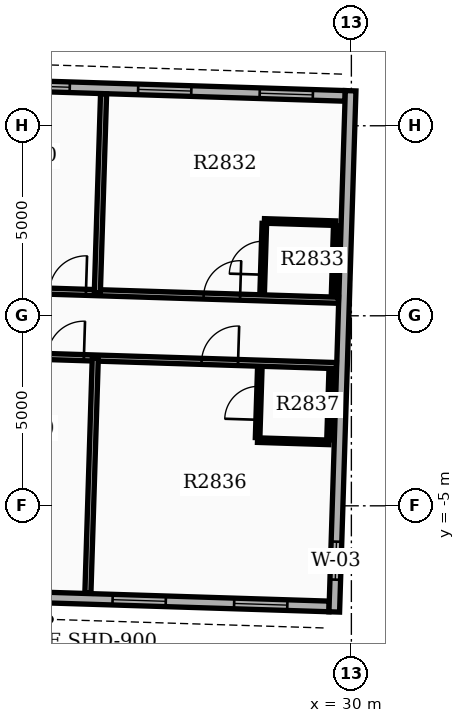
"""IFC4 building model, lengths in metres.
Left out: names, types, materials, properties, quantities, classifications, styles, units other than length and angle.
Written with IfcOpenShell. Run it as: python <this file> out.ifc"""

import sys

from ifc_helpers import new_model, si_unit, direction, frame, frame_2d, origin, place, context, subcontext, project, spatial, rectangle, extrude, element, fill, save


model = new_model("IFC4")
c1 = context("Model", 3, precision=1e-05, world=origin(), true_north=direction((0.0, 1.0)))
c2 = subcontext(c1, "Body", "Model", "MODEL_VIEW")
j1 = project(units=[si_unit("LENGTHUNIT", "METRE"), si_unit("PLANEANGLEUNIT", "RADIAN")], contexts=[c1])
p1 = place(None, origin())
s1 = spatial("IfcSite", under=j1, at=p1, CompositionType="ELEMENT")
p2 = place(p1, origin())
s2 = spatial("IfcBuilding", under=s1, at=p2, CompositionType="ELEMENT")
p3 = place(p2, frame((0.0, 0.0, 176.1)))
s3 = spatial("IfcBuildingStorey", under=s2, at=p3, CompositionType="ELEMENT", Elevation=176.1)
p4 = place(p3, frame((14.721, -7.186, 0.0), z_axis=(0.0, 0.0, 1.0), x_axis=(0.999506714454, -0.031405855522, 0.0)))
e1 = element("IfcWall", 1, at=p4, inside=s3, PredefinedType="STANDARD", context=c2, shape_type="SweptSolid", body=[
    extrude(rectangle(XDim=14.7, YDim=0.28, at=frame_2d((7.35, 0.0))), origin(), (0.0, 0.0, 1.0), 2.97),
])
p5 = place(p4, frame((4.05, 0.0, 0.8)))
e2 = element("IfcOpeningElement", 2, at=p5, cuts=e1, PredefinedType="OPENING", context=c2, shape_type="SweptSolid", body=[
    extrude(rectangle(XDim=1.4, YDim=1.6, at=frame_2d((0.7, 0.8))), frame((0.0, 0.15, 0.0), z_axis=(0.0, -1.0, 0.0), x_axis=(1.0, 0.0, 0.0)), (0.0, 0.0, 1.0), 0.3),
])
p6 = place(p4, frame((9.0, 0.0, 0.8)))
e3 = element("IfcOpeningElement", 3, at=p6, cuts=e1, PredefinedType="OPENING", context=c2, shape_type="SweptSolid", body=[
    extrude(rectangle(XDim=1.4, YDim=1.6, at=frame_2d((0.7, 0.8))), frame((0.0, 0.15, 0.0), z_axis=(0.0, -1.0, 0.0), x_axis=(1.0, 0.0, 0.0)), (0.0, 0.0, 1.0), 0.3),
])
p7 = place(p4, frame((12.2, 0.0, 0.8)))
e4 = element("IfcOpeningElement", 4, at=p7, cuts=e1, PredefinedType="OPENING", context=c2, shape_type="SweptSolid", body=[
    extrude(rectangle(XDim=1.4, YDim=1.6, at=frame_2d((0.7, 0.8))), frame((0.0, 0.15, 0.0), z_axis=(0.0, -1.0, 0.0), x_axis=(1.0, 0.0, 0.0)), (0.0, 0.0, 1.0), 0.3),
])
p8 = place(p4, frame((0.3, 0.0, 0.0)))
e5 = element("IfcOpeningElement", 5, at=p8, cuts=e1, PredefinedType="OPENING", context=c2, shape_type="SweptSolid", body=[
    extrude(rectangle(XDim=0.96, YDim=2.1, at=frame_2d((0.48, 1.05))), frame((0.0, 0.15, 0.0), z_axis=(0.0, -1.0, 0.0), x_axis=(1.0, 0.0, 0.0)), (0.0, 0.0, 1.0), 0.3),
])
p9 = place(p3, frame((29.836, 5.786, 0.0), z_axis=(0.0, 0.0, 1.0), x_axis=(-0.999506698073, 0.031406376864, 0.0)))
e6 = element("IfcWall", 6, at=p9, inside=s3, PredefinedType="STANDARD", context=c2, shape_type="SweptSolid", body=[
    extrude(rectangle(XDim=14.7, YDim=0.28, at=frame_2d((7.35, 0.0))), origin(), (0.0, 0.0, 1.0), 2.97),
])
p10 = place(p9, frame((0.85, 0.0, 0.8)))
e7 = element("IfcOpeningElement", 7, at=p10, cuts=e6, PredefinedType="OPENING", context=c2, shape_type="SweptSolid", body=[
    extrude(rectangle(XDim=1.4, YDim=1.6, at=frame_2d((0.7, 0.8))), frame((0.0, 0.15, 0.0), z_axis=(0.0, -1.0, 0.0), x_axis=(1.0, 0.0, 0.0)), (0.0, 0.0, 1.0), 0.3),
])
p11 = place(p9, frame((4.05, 0.0, 0.8)))
e8 = element("IfcOpeningElement", 8, at=p11, cuts=e6, PredefinedType="OPENING", context=c2, shape_type="SweptSolid", body=[
    extrude(rectangle(XDim=1.4, YDim=1.6, at=frame_2d((0.7, 0.8))), frame((0.0, 0.15, 0.0), z_axis=(0.0, -1.0, 0.0), x_axis=(1.0, 0.0, 0.0)), (0.0, 0.0, 1.0), 0.3),
])
p12 = place(p9, frame((7.25, 0.0, 0.8)))
e9 = element("IfcOpeningElement", 9, at=p12, cuts=e6, PredefinedType="OPENING", context=c2, shape_type="SweptSolid", body=[
    extrude(rectangle(XDim=1.4, YDim=1.6, at=frame_2d((0.7, 0.8))), frame((0.0, 0.15, 0.0), z_axis=(0.0, -1.0, 0.0), x_axis=(1.0, 0.0, 0.0)), (0.0, 0.0, 1.0), 0.3),
])
p13 = place(p9, frame((10.45, 0.0, 0.8)))
e10 = element("IfcOpeningElement", 10, at=p13, cuts=e6, PredefinedType="OPENING", context=c2, shape_type="SweptSolid", body=[
    extrude(rectangle(XDim=1.4, YDim=1.6, at=frame_2d((0.7, 0.8))), frame((0.0, 0.15, 0.0), z_axis=(0.0, -1.0, 0.0), x_axis=(1.0, 0.0, 0.0)), (0.0, 0.0, 1.0), 0.3),
])
p14 = place(p3, frame((29.55, -7.792, 0.0), z_axis=(0.0, 0.0, 1.0), x_axis=(0.031407524763, 0.999506662003, 0.0)))
e11 = element("IfcWall", 11, at=p14, inside=s3, PredefinedType="STANDARD", context=c2, shape_type="SweptSolid", body=[
    extrude(rectangle(XDim=13.72, YDim=0.28, at=frame_2d((6.86, 0.0))), origin(), (0.0, 0.0, 1.0), 2.97),
])
p15 = place(p14, frame((0.85, 0.0, 0.85)))
e12 = element("IfcOpeningElement", 12, at=p15, cuts=e11, PredefinedType="OPENING", context=c2, shape_type="SweptSolid", body=[
    extrude(rectangle(XDim=1.0, YDim=1.5, at=frame_2d((0.5, 0.75))), frame((0.0, 0.15, 0.0), z_axis=(0.0, -1.0, 0.0), x_axis=(1.0, 0.0, 0.0)), (0.0, 0.0, 1.0), 0.3),
])
p16 = place(p3, frame((14.885, 0.873, 0.0), z_axis=(0.0, 0.0, 1.0), x_axis=(0.999506468759, -0.031413673903, 0.0)))
e13 = element("IfcWall", 13, at=p16, inside=s3, PredefinedType="PARTITIONING", context=c2, shape_type="SweptSolid", body=[
    extrude(rectangle(XDim=14.782, YDim=0.16, at=frame_2d((7.391, 0.0))), origin(), (0.0, 0.0, 1.0), 2.96),
])
p17 = place(p16, frame((7.175, 0.0, 0.0)))
e14 = element("IfcOpeningElement", 14, at=p17, cuts=e13, PredefinedType="OPENING", context=c2, shape_type="SweptSolid", body=[
    extrude(rectangle(XDim=0.96, YDim=2.15, at=frame_2d((0.48, 1.075))), frame((0.0, 0.09, 0.0), z_axis=(0.0, -1.0, 0.0), x_axis=(1.0, 0.0, 0.0)), (0.0, 0.0, 1.0), 0.18),
])
p18 = place(p16, frame((11.233, 0.0, 0.0)))
e15 = element("IfcOpeningElement", 15, at=p18, cuts=e13, PredefinedType="OPENING", context=c2, shape_type="SweptSolid", body=[
    extrude(rectangle(XDim=0.96, YDim=2.15, at=frame_2d((0.48, 1.075))), frame((0.0, 0.09, 0.0), z_axis=(0.0, -1.0, 0.0), x_axis=(1.0, 0.0, 0.0)), (0.0, 0.0, 1.0), 0.18),
])
p19 = place(p3, frame((23.316, 0.608, 0.0), z_axis=(0.0, 0.0, 1.0), x_axis=(0.031403737797, 0.999506780994, 0.0)))
e16 = element("IfcWall", 16, at=p19, inside=s3, PredefinedType="PARTITIONING", context=c2, shape_type="SweptSolid", body=[
    extrude(rectangle(XDim=5.232, YDim=0.16, at=frame_2d((2.616, 0.0))), origin(), (0.0, 0.0, 1.0), 2.96),
])
p20 = place(p3, frame((27.653, 0.612, 0.0), z_axis=(0.0, 0.0, 1.0), x_axis=(0.031389704724, 0.999507221803, 0.0)))
e17 = element("IfcWall", 17, at=p20, inside=s3, PredefinedType="PARTITIONING", context=c2, shape_type="SweptSolid", body=[
    extrude(rectangle(XDim=1.82, YDim=0.12, at=frame_2d((0.91, 0.0))), origin(), (0.0, 0.0, 1.0), 2.96),
])
p21 = place(p20, frame((0.47, 0.0, 0.0)))
e18 = element("IfcOpeningElement", 18, at=p21, cuts=e17, PredefinedType="OPENING", context=c2, shape_type="SweptSolid", body=[
    extrude(rectangle(XDim=0.88, YDim=2.1, at=frame_2d((0.44, 1.05))), frame((0.0, 0.07, 0.0), z_axis=(0.0, -1.0, 0.0), x_axis=(1.0, 0.0, 0.0)), (0.0, 0.0, 1.0), 0.14),
])
p22 = place(p3, frame((29.532, 0.553, 0.0), z_axis=(0.0, 0.0, 1.0), x_axis=(0.031389704724, 0.999507221803, 0.0)))
e19 = element("IfcWall", 19, at=p22, inside=s3, PredefinedType="PARTITIONING", context=c2, shape_type="SweptSolid", body=[
    extrude(rectangle(XDim=1.82, YDim=0.12, at=frame_2d((0.91, 0.0))), origin(), (0.0, 0.0, 1.0), 2.96),
])
p23 = place(p3, frame((27.712, 2.496, 0.0), z_axis=(0.0, 0.0, 1.0), x_axis=(0.999505975261, -0.031429371883, 0.0)))
e20 = element("IfcWall", 20, at=p23, inside=s3, PredefinedType="PARTITIONING", context=c2, shape_type="SweptSolid", body=[
    extrude(rectangle(XDim=1.88, YDim=0.12, at=frame_2d((0.94, 0.0))), origin(), (0.0, 0.0, 1.0), 2.96),
])
p24 = place(p3, frame((14.831, -0.846, 0.0), z_axis=(0.0, 0.0, 1.0), x_axis=(0.999506468759, -0.031413673903, 0.0)))
e21 = element("IfcWall", 21, at=p24, inside=s3, PredefinedType="PARTITIONING", context=c2, shape_type="SweptSolid", body=[
    extrude(rectangle(XDim=14.782, YDim=0.16, at=frame_2d((7.391, 0.0))), origin(), (0.0, 0.0, 1.0), 2.96),
])
p25 = place(p24, frame((7.175, 0.0, 0.0)))
e22 = element("IfcOpeningElement", 22, at=p25, cuts=e21, PredefinedType="OPENING", context=c2, shape_type="SweptSolid", body=[
    extrude(rectangle(XDim=0.96, YDim=2.15, at=frame_2d((0.48, 1.075))), frame((0.0, 0.09, 0.0), z_axis=(0.0, -1.0, 0.0), x_axis=(1.0, 0.0, 0.0)), (0.0, 0.0, 1.0), 0.18),
])
p26 = place(p24, frame((11.233, 0.0, 0.0)))
e23 = element("IfcOpeningElement", 23, at=p26, cuts=e21, PredefinedType="OPENING", context=c2, shape_type="SweptSolid", body=[
    extrude(rectangle(XDim=0.96, YDim=2.15, at=frame_2d((0.48, 1.075))), frame((0.0, 0.09, 0.0), z_axis=(0.0, -1.0, 0.0), x_axis=(1.0, 0.0, 0.0)), (0.0, 0.0, 1.0), 0.18),
])
p27 = place(p3, frame((23.262, -1.111, 0.0), z_axis=(0.0, 0.0, 1.0), x_axis=(-0.031424315148, -0.999506134257, 0.0)))
e24 = element("IfcWall", 24, at=p27, inside=s3, PredefinedType="PARTITIONING", context=c2, shape_type="SweptSolid", body=[
    extrude(rectangle(XDim=6.192, YDim=0.16, at=frame_2d((3.096, 0.0))), origin(), (0.0, 0.0, 1.0), 2.96),
])
p28 = place(p3, frame((27.533, -3.206, 0.0), z_axis=(0.0, 0.0, 1.0), x_axis=(0.031389704724, 0.999507221803, 0.0)))
e25 = element("IfcWall", 25, at=p28, inside=s3, PredefinedType="PARTITIONING", context=c2, shape_type="SweptSolid", body=[
    extrude(rectangle(XDim=1.82, YDim=0.12, at=frame_2d((0.91, 0.0))), origin(), (0.0, 0.0, 1.0), 2.96),
])
p29 = place(p28, frame((0.47, 0.0, 0.0)))
e26 = element("IfcOpeningElement", 26, at=p29, cuts=e25, PredefinedType="OPENING", context=c2, shape_type="SweptSolid", body=[
    extrude(rectangle(XDim=0.88, YDim=2.1, at=frame_2d((0.44, 1.05))), frame((0.0, 0.07, 0.0), z_axis=(0.0, -1.0, 0.0), x_axis=(1.0, 0.0, 0.0)), (0.0, 0.0, 1.0), 0.14),
])
p30 = place(p3, frame((29.412, -3.265, 0.0), z_axis=(0.0, 0.0, 1.0), x_axis=(0.031389704724, 0.999507221803, 0.0)))
e27 = element("IfcWall", 27, at=p30, inside=s3, PredefinedType="PARTITIONING", context=c2, shape_type="SweptSolid", body=[
    extrude(rectangle(XDim=1.82, YDim=0.12, at=frame_2d((0.91, 0.0))), origin(), (0.0, 0.0, 1.0), 2.96),
])
p31 = place(p3, frame((27.531, -3.271, 0.0), z_axis=(0.0, 0.0, 1.0), x_axis=(0.999510173889, -0.031295563454, 0.0)))
e28 = element("IfcWall", 28, at=p31, inside=s3, PredefinedType="PARTITIONING", context=c2, shape_type="SweptSolid", body=[
    extrude(rectangle(XDim=1.88, YDim=0.12, at=frame_2d((0.94, 0.0))), origin(), (0.0, 0.0, 1.0), 2.96),
])
p32 = place(p6, origin())
e29 = element("IfcWindow", 29, at=p32, inside=s3, PartitioningType="SINGLE_PANEL", PredefinedType="WINDOW", context=c2, shape_type="SweptSolid", body=[
    extrude(rectangle(XDim=1.4, YDim=1.6, at=frame_2d((0.7, 0.8))), frame((0.0, 0.03, 0.0), z_axis=(0.0, -1.0, 0.0), x_axis=(1.0, 0.0, 0.0)), (0.0, 0.0, 1.0), 0.06),
])
fill(e3, e29)
p33 = place(p7, origin())
e30 = element("IfcWindow", 30, at=p33, inside=s3, PartitioningType="SINGLE_PANEL", PredefinedType="WINDOW", context=c2, shape_type="SweptSolid", body=[
    extrude(rectangle(XDim=1.4, YDim=1.6, at=frame_2d((0.7, 0.8))), frame((0.0, 0.03, 0.0), z_axis=(0.0, -1.0, 0.0), x_axis=(1.0, 0.0, 0.0)), (0.0, 0.0, 1.0), 0.06),
])
fill(e4, e30)
p34 = place(p10, origin())
e31 = element("IfcWindow", 31, at=p34, inside=s3, PartitioningType="SINGLE_PANEL", PredefinedType="WINDOW", context=c2, shape_type="SweptSolid", body=[
    extrude(rectangle(XDim=1.4, YDim=1.6, at=frame_2d((0.7, 0.8))), frame((0.0, 0.03, 0.0), z_axis=(0.0, -1.0, 0.0), x_axis=(1.0, 0.0, 0.0)), (0.0, 0.0, 1.0), 0.06),
])
fill(e7, e31)
p35 = place(p11, origin())
e32 = element("IfcWindow", 32, at=p35, inside=s3, PartitioningType="SINGLE_PANEL", PredefinedType="WINDOW", context=c2, shape_type="SweptSolid", body=[
    extrude(rectangle(XDim=1.4, YDim=1.6, at=frame_2d((0.7, 0.8))), frame((0.0, 0.03, 0.0), z_axis=(0.0, -1.0, 0.0), x_axis=(1.0, 0.0, 0.0)), (0.0, 0.0, 1.0), 0.06),
])
fill(e8, e32)
p36 = place(p12, origin())
e33 = element("IfcWindow", 33, at=p36, inside=s3, PartitioningType="SINGLE_PANEL", PredefinedType="WINDOW", context=c2, shape_type="SweptSolid", body=[
    extrude(rectangle(XDim=1.4, YDim=1.6, at=frame_2d((0.7, 0.8))), frame((0.0, 0.03, 0.0), z_axis=(0.0, -1.0, 0.0), x_axis=(1.0, 0.0, 0.0)), (0.0, 0.0, 1.0), 0.06),
])
fill(e9, e33)
p37 = place(p15, origin())
e34 = element("IfcWindow", 34, at=p37, inside=s3, PartitioningType="SINGLE_PANEL", PredefinedType="WINDOW", context=c2, shape_type="SweptSolid", body=[
    extrude(rectangle(XDim=1.0, YDim=1.5, at=frame_2d((0.5, 0.75))), frame((0.0, 0.03, 0.0), z_axis=(0.0, -1.0, 0.0), x_axis=(1.0, 0.0, 0.0)), (0.0, 0.0, 1.0), 0.06),
])
fill(e12, e34)
p38 = place(p17, origin())
e35 = element("IfcDoor", 35, at=p38, inside=s3, OperationType="SINGLE_SWING_RIGHT", PredefinedType="DOOR", context=c2, shape_type="SweptSolid", body=[
    extrude(rectangle(XDim=0.96, YDim=2.15, at=frame_2d((0.48, 1.075))), frame((0.0, 0.025, 0.0), z_axis=(0.0, -1.0, 0.0), x_axis=(1.0, 0.0, 0.0)), (0.0, 0.0, 1.0), 0.05),
])
fill(e14, e35)
p39 = place(p18, origin())
e36 = element("IfcDoor", 36, at=p39, inside=s3, OperationType="SINGLE_SWING_RIGHT", PredefinedType="DOOR", context=c2, shape_type="SweptSolid", body=[
    extrude(rectangle(XDim=0.96, YDim=2.15, at=frame_2d((0.48, 1.075))), frame((0.0, 0.025, 0.0), z_axis=(0.0, -1.0, 0.0), x_axis=(1.0, 0.0, 0.0)), (0.0, 0.0, 1.0), 0.05),
])
fill(e15, e36)
p40 = place(p21, origin())
e37 = element("IfcDoor", 37, at=p40, inside=s3, OperationType="SINGLE_SWING_LEFT", PredefinedType="DOOR", context=c2, shape_type="SweptSolid", body=[
    extrude(rectangle(XDim=0.88, YDim=2.1, at=frame_2d((0.44, 1.05))), frame((0.0, 0.025, 0.0), z_axis=(0.0, -1.0, 0.0), x_axis=(1.0, 0.0, 0.0)), (0.0, 0.0, 1.0), 0.05),
])
fill(e18, e37)
p41 = place(p25, origin())
e38 = element("IfcDoor", 38, at=p41, inside=s3, OperationType="SINGLE_SWING_RIGHT", PredefinedType="DOOR", context=c2, shape_type="SweptSolid", body=[
    extrude(rectangle(XDim=0.96, YDim=2.15, at=frame_2d((0.48, 1.075))), frame((0.0, 0.025, 0.0), z_axis=(0.0, -1.0, 0.0), x_axis=(1.0, 0.0, 0.0)), (0.0, 0.0, 1.0), 0.05),
])
fill(e22, e38)
p42 = place(p26, origin())
e39 = element("IfcDoor", 39, at=p42, inside=s3, OperationType="SINGLE_SWING_RIGHT", PredefinedType="DOOR", context=c2, shape_type="SweptSolid", body=[
    extrude(rectangle(XDim=0.96, YDim=2.15, at=frame_2d((0.48, 1.075))), frame((0.0, 0.025, 0.0), z_axis=(0.0, -1.0, 0.0), x_axis=(1.0, 0.0, 0.0)), (0.0, 0.0, 1.0), 0.05),
])
fill(e23, e39)
p43 = place(p29, origin())
e40 = element("IfcDoor", 40, at=p43, inside=s3, OperationType="SINGLE_SWING_LEFT", PredefinedType="DOOR", context=c2, shape_type="SweptSolid", body=[
    extrude(rectangle(XDim=0.88, YDim=2.1, at=frame_2d((0.44, 1.05))), frame((0.0, 0.025, 0.0), z_axis=(0.0, -1.0, 0.0), x_axis=(1.0, 0.0, 0.0)), (0.0, 0.0, 1.0), 0.05),
])
fill(e26, e40)
save(model, sys.argv[1])
